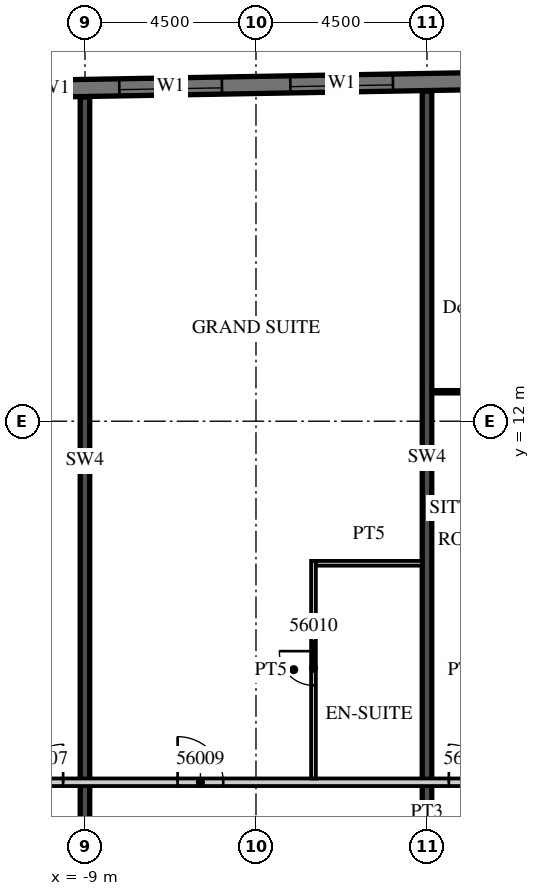
"""IFC4 building model, lengths in metres.
Left out: names, types, materials, properties, quantities, classifications, styles, units other than length and angle.
Written with IfcOpenShell. Run it as: python <this file> out.ifc"""

import sys

from ifc_helpers import new_model, si_unit, direction, frame, frame_2d, origin, place, context, subcontext, project, spatial, rectangle, extrude, element, fill, save


model = new_model("IFC4")
c1 = context("Model", 3, precision=1e-05, world=origin(), true_north=direction((0.0, 1.0)))
c2 = subcontext(c1, "Body", "Model", "MODEL_VIEW")
j1 = project(units=[si_unit("LENGTHUNIT", "METRE"), si_unit("PLANEANGLEUNIT", "RADIAN")], contexts=[c1])
p1 = place(None, origin())
s1 = spatial("IfcSite", under=j1, at=p1, CompositionType="ELEMENT")
p2 = place(p1, origin())
s2 = spatial("IfcBuilding", under=s1, at=p2, CompositionType="ELEMENT")
p3 = place(p2, frame((0.0, 0.0, 230.9)))
s3 = spatial("IfcBuildingStorey", under=s2, at=p3, CompositionType="ELEMENT", Elevation=230.9)
p4 = place(p3, frame((-9.0, 1.4, 0.0), z_axis=(0.0, 0.0, 1.0), x_axis=(0.0, 1.0, 0.0)))
e1 = element("IfcWall", 1, at=p4, inside=s3, PredefinedType="SHEAR", context=c2, shape_type="SweptSolid", body=[
    extrude(rectangle(XDim=19.132, YDim=0.25, at=frame_2d((9.566, 0.0))), origin(), (0.0, 0.0, 1.0), 3.3),
])
p5 = place(p3, frame((0.0, 1.4, 0.0), z_axis=(0.0, 0.0, 1.0), x_axis=(0.0, 1.0, 0.0)))
e2 = element("IfcWall", 2, at=p5, inside=s3, PredefinedType="SHEAR", context=c2, shape_type="SweptSolid", body=[
    extrude(rectangle(XDim=19.289, YDim=0.25, at=frame_2d((9.644, 0.0))), origin(), (0.0, 0.0, 1.0), 3.3),
])
p6 = place(p3, frame((13.504, 21.161, 0.0), z_axis=(0.0, 0.0, 1.0), x_axis=(-0.999847763257, -0.017448504532, 0.0)))
e3 = element("IfcWall", 3, at=p6, inside=s3, PredefinedType="SOLIDWALL", context=c2, shape_type="SweptSolid", body=[
    extrude(rectangle(XDim=46.859, YDim=0.45, at=frame_2d((23.43, 0.0))), origin(), (0.0, 0.0, 1.0), 3.02),
])
p7 = place(p6, frame((0.9, 0.0, 0.45)))
e4 = element("IfcOpeningElement", 4, at=p7, cuts=e3, PredefinedType="OPENING", context=c2, shape_type="SweptSolid", body=[
    extrude(rectangle(XDim=2.7, YDim=2.25, at=frame_2d((1.35, 1.125))), frame((0.0, 0.235, 0.0), z_axis=(0.0, -1.0, 0.0), x_axis=(1.0, 0.0, 0.0)), (0.0, 0.0, 1.0), 0.47),
])
p8 = place(p6, frame((5.401, 0.0, 0.45)))
e5 = element("IfcOpeningElement", 5, at=p8, cuts=e3, PredefinedType="OPENING", context=c2, shape_type="SweptSolid", body=[
    extrude(rectangle(XDim=2.7, YDim=2.25, at=frame_2d((1.35, 1.125))), frame((0.0, 0.235, 0.0), z_axis=(0.0, -1.0, 0.0), x_axis=(1.0, 0.0, 0.0)), (0.0, 0.0, 1.0), 0.47),
])
p9 = place(p6, frame((9.902, 0.0, 0.45)))
e6 = element("IfcOpeningElement", 6, at=p9, cuts=e3, PredefinedType="OPENING", context=c2, shape_type="SweptSolid", body=[
    extrude(rectangle(XDim=2.7, YDim=2.25, at=frame_2d((1.35, 1.125))), frame((0.0, 0.235, 0.0), z_axis=(0.0, -1.0, 0.0), x_axis=(1.0, 0.0, 0.0)), (0.0, 0.0, 1.0), 0.47),
])
p10 = place(p6, frame((14.402, 0.0, 0.45)))
e7 = element("IfcOpeningElement", 7, at=p10, cuts=e3, PredefinedType="OPENING", context=c2, shape_type="SweptSolid", body=[
    extrude(rectangle(XDim=2.7, YDim=2.25, at=frame_2d((1.35, 1.125))), frame((0.0, 0.235, 0.0), z_axis=(0.0, -1.0, 0.0), x_axis=(1.0, 0.0, 0.0)), (0.0, 0.0, 1.0), 0.47),
])
p11 = place(p6, frame((18.903, 0.0, 0.45)))
e8 = element("IfcOpeningElement", 8, at=p11, cuts=e3, PredefinedType="OPENING", context=c2, shape_type="SweptSolid", body=[
    extrude(rectangle(XDim=2.7, YDim=2.25, at=frame_2d((1.35, 1.125))), frame((0.0, 0.235, 0.0), z_axis=(0.0, -1.0, 0.0), x_axis=(1.0, 0.0, 0.0)), (0.0, 0.0, 1.0), 0.47),
])
p12 = place(p6, frame((23.404, 0.0, 0.45)))
e9 = element("IfcOpeningElement", 9, at=p12, cuts=e3, PredefinedType="OPENING", context=c2, shape_type="SweptSolid", body=[
    extrude(rectangle(XDim=2.7, YDim=2.25, at=frame_2d((1.35, 1.125))), frame((0.0, 0.235, 0.0), z_axis=(0.0, -1.0, 0.0), x_axis=(1.0, 0.0, 0.0)), (0.0, 0.0, 1.0), 0.47),
])
p13 = place(p6, frame((27.904, 0.0, 0.45)))
e10 = element("IfcOpeningElement", 10, at=p13, cuts=e3, PredefinedType="OPENING", context=c2, shape_type="SweptSolid", body=[
    extrude(rectangle(XDim=2.7, YDim=2.25, at=frame_2d((1.35, 1.125))), frame((0.0, 0.235, 0.0), z_axis=(0.0, -1.0, 0.0), x_axis=(1.0, 0.0, 0.0)), (0.0, 0.0, 1.0), 0.47),
])
p14 = place(p6, frame((32.405, 0.0, 0.45)))
e11 = element("IfcOpeningElement", 11, at=p14, cuts=e3, PredefinedType="OPENING", context=c2, shape_type="SweptSolid", body=[
    extrude(rectangle(XDim=2.7, YDim=2.25, at=frame_2d((1.35, 1.125))), frame((0.0, 0.235, 0.0), z_axis=(0.0, -1.0, 0.0), x_axis=(1.0, 0.0, 0.0)), (0.0, 0.0, 1.0), 0.47),
])
p15 = place(p6, frame((36.906, 0.0, 0.45)))
e12 = element("IfcOpeningElement", 12, at=p15, cuts=e3, PredefinedType="OPENING", context=c2, shape_type="SweptSolid", body=[
    extrude(rectangle(XDim=2.7, YDim=2.25, at=frame_2d((1.35, 1.125))), frame((0.0, 0.235, 0.0), z_axis=(0.0, -1.0, 0.0), x_axis=(1.0, 0.0, 0.0)), (0.0, 0.0, 1.0), 0.47),
])
p16 = place(p6, frame((41.406, 0.0, 0.45)))
e13 = element("IfcOpeningElement", 13, at=p16, cuts=e3, PredefinedType="OPENING", context=c2, shape_type="SweptSolid", body=[
    extrude(rectangle(XDim=2.7, YDim=2.25, at=frame_2d((1.35, 1.125))), frame((0.0, 0.235, 0.0), z_axis=(0.0, -1.0, 0.0), x_axis=(1.0, 0.0, 0.0)), (0.0, 0.0, 1.0), 0.47),
])
p17 = place(p3, frame((-13.5, 2.5, 0.0), z_axis=(0.0, 0.0, 1.0), x_axis=(1.0, 0.0, 0.0)))
e14 = element("IfcWall", 14, at=p17, inside=s3, PredefinedType="PARTITIONING", context=c2, shape_type="SweptSolid", body=[
    extrude(rectangle(XDim=27.0, YDim=0.2, at=frame_2d((13.5, 0.0))), origin(), (0.0, 0.0, 1.0), 3.02),
])
p18 = place(p17, frame((2.925, 0.0, 0.0)))
e15 = element("IfcOpeningElement", 15, at=p18, cuts=e14, PredefinedType="OPENING", context=c2, shape_type="SweptSolid", body=[
    extrude(rectangle(XDim=1.0, YDim=2.1, at=frame_2d((0.5, 1.05))), frame((0.0, 0.11, 0.0), z_axis=(0.0, -1.0, 0.0), x_axis=(1.0, 0.0, 0.0)), (0.0, 0.0, 1.0), 0.22),
])
p19 = place(p17, frame((6.938, 0.0, 0.0)))
e16 = element("IfcOpeningElement", 16, at=p19, cuts=e14, PredefinedType="OPENING", context=c2, shape_type="SweptSolid", body=[
    extrude(rectangle(XDim=1.2, YDim=2.1, at=frame_2d((0.6, 1.05))), frame((0.0, 0.11, 0.0), z_axis=(0.0, -1.0, 0.0), x_axis=(1.0, 0.0, 0.0)), (0.0, 0.0, 1.0), 0.22),
])
p20 = place(p17, frame((14.075, 0.0, 0.0)))
e17 = element("IfcOpeningElement", 17, at=p20, cuts=e14, PredefinedType="OPENING", context=c2, shape_type="SweptSolid", body=[
    extrude(rectangle(XDim=1.0, YDim=2.1, at=frame_2d((0.5, 1.05))), frame((0.0, 0.11, 0.0), z_axis=(0.0, -1.0, 0.0), x_axis=(1.0, 0.0, 0.0)), (0.0, 0.0, 1.0), 0.22),
])
p21 = place(p17, frame((20.925, 0.0, 0.0)))
e18 = element("IfcOpeningElement", 18, at=p21, cuts=e14, PredefinedType="OPENING", context=c2, shape_type="SweptSolid", body=[
    extrude(rectangle(XDim=1.0, YDim=2.1, at=frame_2d((0.5, 1.05))), frame((0.0, 0.11, 0.0), z_axis=(0.0, -1.0, 0.0), x_axis=(1.0, 0.0, 0.0)), (0.0, 0.0, 1.0), 0.22),
])
p22 = place(p17, frame((25.425, 0.0, 0.0)))
e19 = element("IfcOpeningElement", 19, at=p22, cuts=e14, PredefinedType="OPENING", context=c2, shape_type="SweptSolid", body=[
    extrude(rectangle(XDim=1.0, YDim=2.1, at=frame_2d((0.5, 1.05))), frame((0.0, 0.11, 0.0), z_axis=(0.0, -1.0, 0.0), x_axis=(1.0, 0.0, 0.0)), (0.0, 0.0, 1.0), 0.22),
])
p23 = place(p3, frame((-2.987, 2.6, 0.0), z_axis=(0.0, 0.0, 1.0), x_axis=(0.0, 1.0, 0.0)))
e20 = element("IfcWall", 20, at=p23, inside=s3, PredefinedType="PARTITIONING", context=c2, shape_type="SweptSolid", body=[
    extrude(rectangle(XDim=5.725, YDim=0.125, at=frame_2d((2.862, 0.0))), origin(), (0.0, 0.0, 1.0), 3.02),
])
p24 = place(p23, frame((2.45, 0.0, 0.0)))
e21 = element("IfcOpeningElement", 21, at=p24, cuts=e20, PredefinedType="OPENING", context=c2, shape_type="SweptSolid", body=[
    extrude(rectangle(XDim=0.9, YDim=2.1, at=frame_2d((0.45, 1.05))), frame((0.0, 0.073, 0.0), z_axis=(0.0, -1.0, 0.0), x_axis=(1.0, 0.0, 0.0)), (0.0, 0.0, 1.0), 0.145),
])
p25 = place(p3, frame((-2.925, 8.262, 0.0), z_axis=(0.0, 0.0, 1.0), x_axis=(1.0, 0.0, 0.0)))
e22 = element("IfcWall", 22, at=p25, inside=s3, PredefinedType="PARTITIONING", context=c2, shape_type="SweptSolid", body=[
    extrude(rectangle(XDim=2.8, YDim=0.125, at=frame_2d((1.4, 0.0))), origin(), (0.0, 0.0, 1.0), 3.02),
])
p26 = place(p3, frame((0.125, 12.775, 0.0), z_axis=(0.0, 0.0, 1.0), x_axis=(1.0, 0.0, 0.0)))
e23 = element("IfcWall", 23, at=p26, inside=s3, PredefinedType="PARTITIONING", context=c2, shape_type="SweptSolid", body=[
    extrude(rectangle(XDim=4.275, YDim=0.1, at=frame_2d((2.137, 0.0))), origin(), (0.0, 0.0, 1.0), 3.02),
])
p27 = place(p26, frame((1.388, 0.0, 0.0)))
e24 = element("IfcOpeningElement", 24, at=p27, cuts=e23, PredefinedType="OPENING", context=c2, shape_type="SweptSolid", body=[
    extrude(rectangle(XDim=1.5, YDim=2.1, at=frame_2d((0.75, 1.05))), frame((0.0, 0.06, 0.0), z_axis=(0.0, -1.0, 0.0), x_axis=(1.0, 0.0, 0.0)), (0.0, 0.0, 1.0), 0.12),
])
p28 = place(p10, origin())
e25 = element("IfcWindow", 25, at=p28, inside=s3, PartitioningType="SINGLE_PANEL", PredefinedType="WINDOW", context=c2, shape_type="SweptSolid", body=[
    extrude(rectangle(XDim=2.7, YDim=2.25, at=frame_2d((1.35, 1.125))), frame((0.0, 0.09, 0.0), z_axis=(0.0, -1.0, 0.0), x_axis=(1.0, 0.0, 0.0)), (0.0, 0.0, 1.0), 0.06),
])
fill(e7, e25)
p29 = place(p11, origin())
e26 = element("IfcWindow", 26, at=p29, inside=s3, PartitioningType="SINGLE_PANEL", PredefinedType="WINDOW", context=c2, shape_type="SweptSolid", body=[
    extrude(rectangle(XDim=2.7, YDim=2.25, at=frame_2d((1.35, 1.125))), frame((0.0, 0.09, 0.0), z_axis=(0.0, -1.0, 0.0), x_axis=(1.0, 0.0, 0.0)), (0.0, 0.0, 1.0), 0.06),
])
fill(e8, e26)
p30 = place(p18, origin())
e27 = element("IfcDoor", 27, at=p30, inside=s3, OperationType="SINGLE_SWING_RIGHT", PredefinedType="DOOR", context=c2, shape_type="SweptSolid", body=[
    extrude(rectangle(XDim=1.0, YDim=2.1, at=frame_2d((0.5, 1.05))), frame((0.0, 0.025, 0.0), z_axis=(0.0, -1.0, 0.0), x_axis=(1.0, 0.0, 0.0)), (0.0, 0.0, 1.0), 0.05),
])
fill(e15, e27)
p31 = place(p19, origin())
e28 = element("IfcDoor", 28, at=p31, inside=s3, OperationType="SINGLE_SWING_LEFT", PredefinedType="DOOR", context=c2, shape_type="SweptSolid", body=[
    extrude(rectangle(XDim=1.2, YDim=2.1, at=frame_2d((0.6, 1.05))), frame((0.0, 0.025, 0.0), z_axis=(0.0, -1.0, 0.0), x_axis=(1.0, 0.0, 0.0)), (0.0, 0.0, 1.0), 0.05),
])
fill(e16, e28)
p32 = place(p24, origin())
e29 = element("IfcDoor", 29, at=p32, inside=s3, OperationType="SINGLE_SWING_RIGHT", PredefinedType="DOOR", context=c2, shape_type="SweptSolid", body=[
    extrude(rectangle(XDim=0.9, YDim=2.1, at=frame_2d((0.45, 1.05))), frame((0.0, 0.025, 0.0), z_axis=(0.0, -1.0, 0.0), x_axis=(1.0, 0.0, 0.0)), (0.0, 0.0, 1.0), 0.05),
])
fill(e21, e29)
p33 = place(p20, origin())
e30 = element("IfcDoor", 30, at=p33, inside=s3, OperationType="SINGLE_SWING_LEFT", PredefinedType="DOOR", context=c2, shape_type="SweptSolid", body=[
    extrude(rectangle(XDim=1.0, YDim=2.1, at=frame_2d((0.5, 1.05))), frame((0.0, 0.025, 0.0), z_axis=(0.0, -1.0, 0.0), x_axis=(1.0, 0.0, 0.0)), (0.0, 0.0, 1.0), 0.05),
])
fill(e17, e30)
save(model, sys.argv[1])
